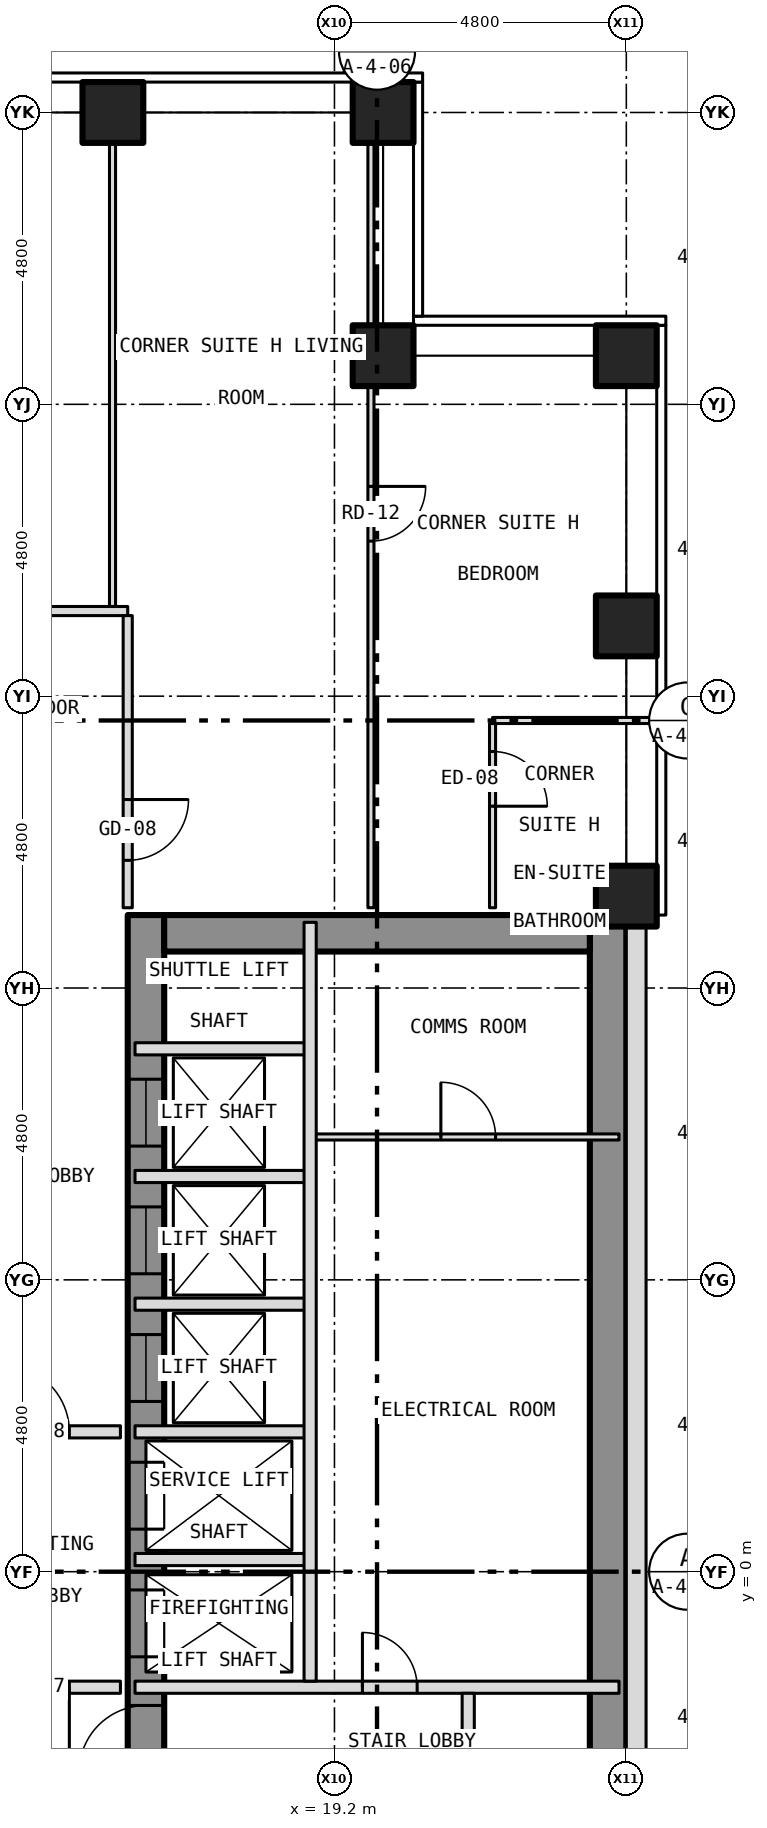
"""IFC4 building model, lengths in metres.
Left out: names, types, materials, properties, quantities, classifications, styles, units other than length and angle.
Written with IfcOpenShell. Run it as: python <this file> out.ifc"""

import sys

from ifc_helpers import new_model, si_unit, direction, frame, frame_2d, origin, origin_2d, place, context, subcontext, project, spatial, rectangle, hollow_rectangle, extrude, element, fill, save


model = new_model("IFC4")
c1 = context("Model", 3, precision=1e-05, world=origin(), true_north=direction((0.0, 1.0)))
c2 = subcontext(c1, "Body", "Model", "MODEL_VIEW")
j1 = project(units=[si_unit("LENGTHUNIT", "METRE"), si_unit("PLANEANGLEUNIT", "RADIAN")], contexts=[c1])
p1 = place(None, origin())
s1 = spatial("IfcSite", under=j1, at=p1, CompositionType="ELEMENT")
p2 = place(p1, origin())
s2 = spatial("IfcBuilding", under=s1, at=p2, CompositionType="ELEMENT")
p3 = place(p2, frame((0.0, 0.0, 74.0)))
s3 = spatial("IfcBuildingStorey", under=s2, at=p3, CompositionType="ELEMENT", Elevation=74.0)
for number, where, z_axis, x_axis in (
    (1, (15.556, 24.0, -0.15), (0.0, 0.0, 1.0), (1.0, 0.0, 0.0)),
    (2, (20.0, 24.0, -0.15), (0.0, 0.0, 1.0), (1.0, 0.0, 0.0)),
    (3, (24.0, 11.111, -0.15), (0.0, 0.0, 1.0), (1.0, 0.0, 0.0)),
    (4, (24.0, 15.556, -0.15), (0.0, 0.0, 1.0), (1.0, 0.0, 0.0)),
    (5, (24.0, 20.0, -0.15), (0.0, 0.0, 1.0), (1.0, 0.0, 0.0)),
    (6, (20.0, 20.0, -0.15), (0.0, 0.0, 1.0), (1.0, 0.0, 0.0)),
):
    element("IfcColumn", number, at=place(p3, frame(where, z_axis=z_axis, x_axis=x_axis)), inside=s3, PredefinedType="COLUMN", context=c2, shape_type="SweptSolid", body=[
        extrude(hollow_rectangle(XDim=1.0, YDim=1.0, WallThickness=0.06, at=origin_2d()), origin(), (0.0, 0.0, 1.0), 3.5),
    ])
p4 = place(p3, frame((16.1, -10.8, 0.0), z_axis=(0.0, 0.0, 1.0), x_axis=(0.0, 1.0, 0.0)))
e7 = element("IfcWall", 7, at=p4, inside=s3, PredefinedType="SHEAR", context=c2, shape_type="SweptSolid", body=[
    extrude(rectangle(XDim=21.6, YDim=0.6, at=frame_2d((10.8, 0.0))), origin(), (0.0, 0.0, 1.0), 3.25),
])
p5 = place(p4, frame((9.4, 0.0, 0.0)))
e8 = element("IfcOpeningElement", 8, at=p5, cuts=e7, PredefinedType="OPENING", context=c2, shape_type="SweptSolid", body=[
    extrude(rectangle(XDim=1.1, YDim=2.1, at=frame_2d((0.55, 1.05))), frame((0.0, 0.312, 0.0), z_axis=(0.0, -1.0, 0.0), x_axis=(1.0, 0.0, 0.0)), (0.0, 0.0, 1.0), 0.624),
])
p6 = place(p4, frame((11.5, 0.0, 0.0)))
e9 = element("IfcOpeningElement", 9, at=p6, cuts=e7, PredefinedType="OPENING", context=c2, shape_type="SweptSolid", body=[
    extrude(rectangle(XDim=1.1, YDim=2.1, at=frame_2d((0.55, 1.05))), frame((0.0, 0.312, 0.0), z_axis=(0.0, -1.0, 0.0), x_axis=(1.0, 0.0, 0.0)), (0.0, 0.0, 1.0), 0.624),
])
p7 = place(p4, frame((13.6, 0.0, 0.0)))
e10 = element("IfcOpeningElement", 10, at=p7, cuts=e7, PredefinedType="OPENING", context=c2, shape_type="SweptSolid", body=[
    extrude(rectangle(XDim=1.1, YDim=2.1, at=frame_2d((0.55, 1.05))), frame((0.0, 0.312, 0.0), z_axis=(0.0, -1.0, 0.0), x_axis=(1.0, 0.0, 0.0)), (0.0, 0.0, 1.0), 0.624),
])
p8 = place(p4, frame((15.7, 0.0, 0.0)))
e11 = element("IfcOpeningElement", 11, at=p8, cuts=e7, PredefinedType="OPENING", context=c2, shape_type="SweptSolid", body=[
    extrude(rectangle(XDim=1.1, YDim=2.1, at=frame_2d((0.55, 1.05))), frame((0.0, 0.312, 0.0), z_axis=(0.0, -1.0, 0.0), x_axis=(1.0, 0.0, 0.0)), (0.0, 0.0, 1.0), 0.624),
])
p9 = place(p4, frame((17.8, 0.0, 0.0)))
e12 = element("IfcOpeningElement", 12, at=p9, cuts=e7, PredefinedType="OPENING", context=c2, shape_type="SweptSolid", body=[
    extrude(rectangle(XDim=1.1, YDim=2.1, at=frame_2d((0.55, 1.05))), frame((0.0, 0.312, 0.0), z_axis=(0.0, -1.0, 0.0), x_axis=(1.0, 0.0, 0.0)), (0.0, 0.0, 1.0), 0.624),
])
p10 = place(p4, frame((5.642, 0.0, 0.0)))
e13 = element("IfcOpeningElement", 13, at=p10, cuts=e7, PredefinedType="OPENING", context=c2, shape_type="SweptSolid", body=[
    extrude(rectangle(XDim=1.1, YDim=2.1, at=frame_2d((0.55, 1.05))), frame((0.0, 0.312, 0.0), z_axis=(0.0, -1.0, 0.0), x_axis=(1.0, 0.0, 0.0)), (0.0, 0.0, 1.0), 0.624),
])
p11 = place(p4, frame((7.5, 0.0, 0.0)))
e14 = element("IfcOpeningElement", 14, at=p11, cuts=e7, PredefinedType="OPENING", context=c2, shape_type="SweptSolid", body=[
    extrude(rectangle(XDim=1.1, YDim=2.1, at=frame_2d((0.55, 1.05))), frame((0.0, 0.312, 0.0), z_axis=(0.0, -1.0, 0.0), x_axis=(1.0, 0.0, 0.0)), (0.0, 0.0, 1.0), 0.624),
])
p12 = place(p3, frame((23.7, -10.8, 0.0), z_axis=(0.0, 0.0, 1.0), x_axis=(0.0, 1.0, 0.0)))
e15 = element("IfcWall", 15, at=p12, inside=s3, PredefinedType="SHEAR", context=c2, shape_type="SweptSolid", body=[
    extrude(rectangle(XDim=21.6, YDim=0.6, at=frame_2d((10.8, 0.0))), origin(), (0.0, 0.0, 1.0), 3.25),
])
p13 = place(p3, frame((16.4, 10.5, 0.0), z_axis=(0.0, 0.0, 1.0), x_axis=(1.0, 0.0, 0.0)))
e16 = element("IfcWall", 16, at=p13, inside=s3, PredefinedType="SHEAR", context=c2, shape_type="SweptSolid", body=[
    extrude(rectangle(XDim=7.0, YDim=0.6, at=frame_2d((3.5, 0.0))), origin(), (0.0, 0.0, 1.0), 3.25),
])
p14 = place(p3, frame((24.163, -10.8, 0.0), z_axis=(0.0, 0.0, 1.0), x_axis=(0.0, 1.0, 0.0)))
e17 = element("IfcWall", 17, at=p14, inside=s3, PredefinedType="SOLIDWALL", context=c2, shape_type="SweptSolid", body=[
    extrude(rectangle(XDim=21.6, YDim=0.325, at=frame_2d((10.8, 0.0))), origin(), (0.0, 0.0, 1.0), 3.5),
])
p15 = place(p14, frame((2.95, 0.0, 1.0)))
e18 = element("IfcOpeningElement", 18, at=p15, cuts=e17, PredefinedType="OPENING", context=c2, shape_type="SweptSolid", body=[
    extrude(rectangle(XDim=0.6, YDim=1.5, at=frame_2d((0.3, 0.75))), frame((0.0, 0.175, 0.0), z_axis=(0.0, -1.0, 0.0), x_axis=(1.0, 0.0, 0.0)), (0.0, 0.0, 1.0), 0.349),
])
p16 = place(p3, frame((12.4, -1.9, 0.0), z_axis=(0.0, 0.0, 1.0), x_axis=(1.0, 0.0, 0.0)))
e19 = element("IfcWall", 19, at=p16, inside=s3, PredefinedType="PARTITIONING", context=c2, shape_type="SweptSolid", body=[
    extrude(rectangle(XDim=3.28, YDim=0.2, at=frame_2d((1.64, 0.0))), origin(), (0.0, 0.0, 1.0), 3.35),
])
p17 = place(p16, frame((1.34, 0.0, 0.0)))
e20 = element("IfcOpeningElement", 20, at=p17, cuts=e19, PredefinedType="OPENING", context=c2, shape_type="SweptSolid", body=[
    extrude(rectangle(XDim=1.1, YDim=2.1, at=frame_2d((0.55, 1.05))), frame((0.0, 0.112, 0.0), z_axis=(0.0, -1.0, 0.0), x_axis=(1.0, 0.0, 0.0)), (0.0, 0.0, 1.0), 0.224),
])
p18 = place(p3, frame((15.92, -1.9, 0.0), z_axis=(0.0, 0.0, 1.0), x_axis=(1.0, 0.0, 0.0)))
e21 = element("IfcWall", 21, at=p18, inside=s3, PredefinedType="PARTITIONING", context=c2, shape_type="SweptSolid", body=[
    extrude(rectangle(XDim=7.96, YDim=0.2, at=frame_2d((3.98, 0.0))), origin(), (0.0, 0.0, 1.0), 3.25),
])
p19 = place(p18, frame((3.74, 0.0, 0.0)))
e22 = element("IfcOpeningElement", 22, at=p19, cuts=e21, PredefinedType="OPENING", context=c2, shape_type="SweptSolid", body=[
    extrude(rectangle(XDim=0.9, YDim=2.1, at=frame_2d((0.45, 1.05))), frame((0.0, 0.112, 0.0), z_axis=(0.0, -1.0, 0.0), x_axis=(1.0, 0.0, 0.0)), (0.0, 0.0, 1.0), 0.224),
])
p20 = place(p3, frame((15.92, 0.2, 0.0), z_axis=(0.0, 0.0, 1.0), x_axis=(1.0, 0.0, 0.0)))
e23 = element("IfcWall", 23, at=p20, inside=s3, PredefinedType="PARTITIONING", context=c2, shape_type="SweptSolid", body=[
    extrude(rectangle(XDim=2.88, YDim=0.2, at=frame_2d((1.44, 0.0))), origin(), (0.0, 0.0, 1.0), 3.25),
])
p21 = place(p3, frame((12.4, 2.3, 0.0), z_axis=(0.0, 0.0, 1.0), x_axis=(1.0, 0.0, 0.0)))
e24 = element("IfcWall", 24, at=p21, inside=s3, PredefinedType="PARTITIONING", context=c2, shape_type="SweptSolid", body=[
    extrude(rectangle(XDim=3.28, YDim=0.2, at=frame_2d((1.64, 0.0))), origin(), (0.0, 0.0, 1.0), 3.35),
])
p22 = place(p21, frame((1.34, 0.0, 0.0)))
e25 = element("IfcOpeningElement", 25, at=p22, cuts=e24, PredefinedType="OPENING", context=c2, shape_type="SweptSolid", body=[
    extrude(rectangle(XDim=1.1, YDim=2.1, at=frame_2d((0.55, 1.05))), frame((0.0, 0.112, 0.0), z_axis=(0.0, -1.0, 0.0), x_axis=(1.0, 0.0, 0.0)), (0.0, 0.0, 1.0), 0.224),
])
for number, where, z_axis, x_axis in (
    (26, (15.92, 2.3, 0.0), (0.0, 0.0, 1.0), (1.0, 0.0, 0.0)),
    (27, (15.92, 4.4, 0.0), (0.0, 0.0, 1.0), (1.0, 0.0, 0.0)),
    (28, (15.92, 6.5, 0.0), (0.0, 0.0, 1.0), (1.0, 0.0, 0.0)),
):
    element("IfcWall", number, at=place(p3, frame(where, z_axis=z_axis, x_axis=x_axis)), inside=s3, PredefinedType="PARTITIONING", context=c2, shape_type="SweptSolid", body=[
        extrude(rectangle(XDim=2.88, YDim=0.2, at=frame_2d((1.44, 0.0))), origin(), (0.0, 0.0, 1.0), 3.25),
    ])
p23 = place(p3, frame((18.8, 7.15, 0.0), z_axis=(0.0, 0.0, 1.0), x_axis=(1.0, 0.0, 0.0)))
e29 = element("IfcWall", 29, at=p23, inside=s3, PredefinedType="PARTITIONING", context=c2, shape_type="SweptSolid", body=[
    extrude(rectangle(XDim=5.08, YDim=0.1, at=frame_2d((2.54, 0.0))), origin(), (0.0, 0.0, 1.0), 3.25),
])
p24 = place(p23, frame((2.15, 0.0, 0.0)))
e30 = element("IfcOpeningElement", 30, at=p24, cuts=e29, PredefinedType="OPENING", context=c2, shape_type="SweptSolid", body=[
    extrude(rectangle(XDim=0.9, YDim=2.1, at=frame_2d((0.45, 1.05))), frame((0.0, 0.062, 0.0), z_axis=(0.0, -1.0, 0.0), x_axis=(1.0, 0.0, 0.0)), (0.0, 0.0, 1.0), 0.124),
])
p25 = place(p3, frame((15.92, 8.6, 0.0), z_axis=(0.0, 0.0, 1.0), x_axis=(1.0, 0.0, 0.0)))
e31 = element("IfcWall", 31, at=p25, inside=s3, PredefinedType="PARTITIONING", context=c2, shape_type="SweptSolid", body=[
    extrude(rectangle(XDim=2.88, YDim=0.2, at=frame_2d((1.44, 0.0))), origin(), (0.0, 0.0, 1.0), 3.25),
])
p26 = place(p3, frame((21.8, 14.0, 0.0), z_axis=(0.0, 0.0, 1.0), x_axis=(1.0, 0.0, 0.0)))
e32 = element("IfcWall", 32, at=p26, inside=s3, PredefinedType="PARTITIONING", context=c2, shape_type="SweptSolid", body=[
    extrude(rectangle(XDim=2.73, YDim=0.1, at=frame_2d((1.365, 0.0))), origin(), (0.0, 0.0, 1.0), 3.35),
])
p27 = place(p3, frame((9.15, 15.8, 0.0), z_axis=(0.0, 0.0, 1.0), x_axis=(1.0, 0.0, 0.0)))
e33 = element("IfcWall", 33, at=p27, inside=s3, PredefinedType="PARTITIONING", context=c2, shape_type="SweptSolid", body=[
    extrude(rectangle(XDim=6.65, YDim=0.15, at=frame_2d((3.325, 0.0))), origin(), (0.0, 0.0, 1.0), 3.35),
])
p28 = place(p27, frame((3.803, 0.0, 0.0)))
e34 = element("IfcOpeningElement", 34, at=p28, cuts=e33, PredefinedType="OPENING", context=c2, shape_type="SweptSolid", body=[
    extrude(rectangle(XDim=1.0, YDim=2.1, at=frame_2d((0.5, 1.05))), frame((0.0, 0.087, 0.0), z_axis=(0.0, -1.0, 0.0), x_axis=(1.0, 0.0, 0.0)), (0.0, 0.0, 1.0), 0.174),
])
p29 = place(p3, frame((15.55, 15.875, 0.0), z_axis=(0.0, 0.0, 1.0), x_axis=(0.0, 1.0, 0.0)))
e35 = element("IfcWall", 35, at=p29, inside=s3, PredefinedType="PARTITIONING", context=c2, shape_type="SweptSolid", body=[
    extrude(rectangle(XDim=8.005, YDim=0.1, at=frame_2d((4.002, 0.0))), origin(), (0.0, 0.0, 1.0), 3.35),
])
p30 = place(p3, frame((15.8, 10.92, 0.0), z_axis=(0.0, 0.0, 1.0), x_axis=(0.0, 1.0, 0.0)))
e36 = element("IfcWall", 36, at=p30, inside=s3, PredefinedType="PARTITIONING", context=c2, shape_type="SweptSolid", body=[
    extrude(rectangle(XDim=4.805, YDim=0.15, at=frame_2d((2.403, 0.0))), origin(), (0.0, 0.0, 1.0), 3.35),
])
p31 = place(p30, frame((0.78, 0.0, 0.0)))
e37 = element("IfcOpeningElement", 37, at=p31, cuts=e36, PredefinedType="OPENING", context=c2, shape_type="SweptSolid", body=[
    extrude(rectangle(XDim=1.0, YDim=2.1, at=frame_2d((0.5, 1.05))), frame((0.0, 0.087, 0.0), z_axis=(0.0, -1.0, 0.0), x_axis=(1.0, 0.0, 0.0)), (0.0, 0.0, 1.0), 0.174),
])
p32 = place(p3, frame((18.8, -1.8, 0.0), z_axis=(0.0, 0.0, 1.0), x_axis=(0.0, 1.0, 0.0)))
e38 = element("IfcWall", 38, at=p32, inside=s3, PredefinedType="PARTITIONING", context=c2, shape_type="SweptSolid", body=[
    extrude(rectangle(XDim=12.48, YDim=0.2, at=frame_2d((6.24, 0.0))), origin(), (0.0, 0.0, 1.0), 3.25),
])
p33 = place(p3, frame((19.8, 10.92, 0.0), z_axis=(0.0, 0.0, 1.0), x_axis=(0.0, 1.0, 0.0)))
e39 = element("IfcWall", 39, at=p33, inside=s3, PredefinedType="PARTITIONING", context=c2, shape_type="SweptSolid", body=[
    extrude(rectangle(XDim=12.96, YDim=0.1, at=frame_2d((6.48, 0.0))), origin(), (0.0, 0.0, 1.0), 3.35),
])
p34 = place(p33, frame((6.03, 0.0, 0.0)))
e40 = element("IfcOpeningElement", 40, at=p34, cuts=e39, PredefinedType="OPENING", context=c2, shape_type="SweptSolid", body=[
    extrude(rectangle(XDim=0.9, YDim=2.1, at=frame_2d((0.45, 1.05))), frame((0.0, 0.062, 0.0), z_axis=(0.0, -1.0, 0.0), x_axis=(1.0, 0.0, 0.0)), (0.0, 0.0, 1.0), 0.124),
])
p35 = place(p3, frame((21.4, -10.68, 0.0), z_axis=(0.0, 0.0, 1.0), x_axis=(0.0, 1.0, 0.0)))
e41 = element("IfcWall", 41, at=p35, inside=s3, PredefinedType="PARTITIONING", context=c2, shape_type="SweptSolid", body=[
    extrude(rectangle(XDim=8.68, YDim=0.2, at=frame_2d((4.34, 0.0))), origin(), (0.0, 0.0, 1.0), 3.25),
])
p36 = place(p35, frame((1.21, 0.0, 0.0)))
e42 = element("IfcOpeningElement", 42, at=p36, cuts=e41, PredefinedType="OPENING", context=c2, shape_type="SweptSolid", body=[
    extrude(rectangle(XDim=0.9, YDim=2.1, at=frame_2d((0.45, 1.05))), frame((0.0, 0.112, 0.0), z_axis=(0.0, -1.0, 0.0), x_axis=(1.0, 0.0, 0.0)), (0.0, 0.0, 1.0), 0.224),
])
p37 = place(p35, frame((5.66, 0.0, 0.0)))
e43 = element("IfcOpeningElement", 43, at=p37, cuts=e41, PredefinedType="OPENING", context=c2, shape_type="SweptSolid", body=[
    extrude(rectangle(XDim=0.9, YDim=2.1, at=frame_2d((0.45, 1.05))), frame((0.0, 0.112, 0.0), z_axis=(0.0, -1.0, 0.0), x_axis=(1.0, 0.0, 0.0)), (0.0, 0.0, 1.0), 0.224),
])
p38 = place(p3, frame((21.8, 10.92, 0.0), z_axis=(0.0, 0.0, 1.0), x_axis=(0.0, 1.0, 0.0)))
e44 = element("IfcWall", 44, at=p38, inside=s3, PredefinedType="PARTITIONING", context=c2, shape_type="SweptSolid", body=[
    extrude(rectangle(XDim=3.03, YDim=0.1, at=frame_2d((1.515, 0.0))), origin(), (0.0, 0.0, 1.0), 3.35),
])
p39 = place(p38, frame((1.67, 0.0, 0.0)))
e45 = element("IfcOpeningElement", 45, at=p39, cuts=e44, PredefinedType="OPENING", context=c2, shape_type="SweptSolid", body=[
    extrude(rectangle(XDim=0.9, YDim=2.1, at=frame_2d((0.45, 1.05))), frame((0.0, 0.062, 0.0), z_axis=(0.0, -1.0, 0.0), x_axis=(1.0, 0.0, 0.0)), (0.0, 0.0, 1.0), 0.124),
])
p40 = place(p5, origin())
e46 = element("IfcDoor", 46, at=p40, inside=s3, OperationType="SLIDING_TO_LEFT", PredefinedType="DOOR", context=c2, shape_type="SweptSolid", body=[
    extrude(rectangle(XDim=1.1, YDim=2.1, at=frame_2d((0.55, 1.05))), frame((0.0, 0.025, 0.0), z_axis=(0.0, -1.0, 0.0), x_axis=(1.0, 0.0, 0.0)), (0.0, 0.0, 1.0), 0.05),
])
fill(e8, e46)
p41 = place(p6, origin())
e47 = element("IfcDoor", 47, at=p41, inside=s3, OperationType="SLIDING_TO_LEFT", PredefinedType="DOOR", context=c2, shape_type="SweptSolid", body=[
    extrude(rectangle(XDim=1.1, YDim=2.1, at=frame_2d((0.55, 1.05))), frame((0.0, 0.025, 0.0), z_axis=(0.0, -1.0, 0.0), x_axis=(1.0, 0.0, 0.0)), (0.0, 0.0, 1.0), 0.05),
])
fill(e9, e47)
p42 = place(p7, origin())
e48 = element("IfcDoor", 48, at=p42, inside=s3, OperationType="SLIDING_TO_LEFT", PredefinedType="DOOR", context=c2, shape_type="SweptSolid", body=[
    extrude(rectangle(XDim=1.1, YDim=2.1, at=frame_2d((0.55, 1.05))), frame((0.0, 0.025, 0.0), z_axis=(0.0, -1.0, 0.0), x_axis=(1.0, 0.0, 0.0)), (0.0, 0.0, 1.0), 0.05),
])
fill(e10, e48)
p43 = place(p8, origin())
e49 = element("IfcDoor", 49, at=p43, inside=s3, OperationType="SLIDING_TO_LEFT", PredefinedType="DOOR", context=c2, shape_type="SweptSolid", body=[
    extrude(rectangle(XDim=1.1, YDim=2.1, at=frame_2d((0.55, 1.05))), frame((0.0, 0.025, 0.0), z_axis=(0.0, -1.0, 0.0), x_axis=(1.0, 0.0, 0.0)), (0.0, 0.0, 1.0), 0.05),
])
fill(e11, e49)
p44 = place(p9, origin())
e50 = element("IfcDoor", 50, at=p44, inside=s3, OperationType="SLIDING_TO_LEFT", PredefinedType="DOOR", context=c2, shape_type="SweptSolid", body=[
    extrude(rectangle(XDim=1.1, YDim=2.1, at=frame_2d((0.55, 1.05))), frame((0.0, 0.025, 0.0), z_axis=(0.0, -1.0, 0.0), x_axis=(1.0, 0.0, 0.0)), (0.0, 0.0, 1.0), 0.05),
])
fill(e12, e50)
p45 = place(p11, origin())
e51 = element("IfcDoor", 51, at=p45, inside=s3, OperationType="SINGLE_SWING_LEFT", PredefinedType="DOOR", context=c2, shape_type="SweptSolid", body=[
    extrude(rectangle(XDim=1.1, YDim=2.1, at=frame_2d((0.55, 1.05))), frame((0.0, 0.025, 0.0), z_axis=(0.0, -1.0, 0.0), x_axis=(1.0, 0.0, 0.0)), (0.0, 0.0, 1.0), 0.05),
])
fill(e14, e51)
p46 = place(p19, origin())
e52 = element("IfcDoor", 52, at=p46, inside=s3, OperationType="SINGLE_SWING_LEFT", PredefinedType="DOOR", context=c2, shape_type="SweptSolid", body=[
    extrude(rectangle(XDim=0.9, YDim=2.1, at=frame_2d((0.45, 1.05))), frame((0.0, 0.025, 0.0), z_axis=(0.0, -1.0, 0.0), x_axis=(1.0, 0.0, 0.0)), (0.0, 0.0, 1.0), 0.05),
])
fill(e22, e52)
p47 = place(p24, origin())
e53 = element("IfcDoor", 53, at=p47, inside=s3, OperationType="SINGLE_SWING_LEFT", PredefinedType="DOOR", context=c2, shape_type="SweptSolid", body=[
    extrude(rectangle(XDim=0.9, YDim=2.1, at=frame_2d((0.45, 1.05))), frame((0.0, 0.025, 0.0), z_axis=(0.0, -1.0, 0.0), x_axis=(1.0, 0.0, 0.0)), (0.0, 0.0, 1.0), 0.05),
])
fill(e30, e53)
p48 = place(p17, origin())
e54 = element("IfcDoor", 54, at=p48, inside=s3, OperationType="SINGLE_SWING_RIGHT", PredefinedType="DOOR", context=c2, shape_type="SweptSolid", body=[
    extrude(rectangle(XDim=1.1, YDim=2.1, at=frame_2d((0.55, 1.05))), frame((0.0, 0.025, 0.0), z_axis=(0.0, -1.0, 0.0), x_axis=(1.0, 0.0, 0.0)), (0.0, 0.0, 1.0), 0.05),
])
fill(e20, e54)
p49 = place(p22, origin())
e55 = element("IfcDoor", 55, at=p49, inside=s3, OperationType="SINGLE_SWING_LEFT", PredefinedType="DOOR", context=c2, shape_type="SweptSolid", body=[
    extrude(rectangle(XDim=1.1, YDim=2.1, at=frame_2d((0.55, 1.05))), frame((0.0, 0.025, 0.0), z_axis=(0.0, -1.0, 0.0), x_axis=(1.0, 0.0, 0.0)), (0.0, 0.0, 1.0), 0.05),
])
fill(e25, e55)
p50 = place(p31, origin())
e56 = element("IfcDoor", 56, at=p50, inside=s3, OperationType="SINGLE_SWING_RIGHT", PredefinedType="DOOR", context=c2, shape_type="SweptSolid", body=[
    extrude(rectangle(XDim=1.0, YDim=2.1, at=frame_2d((0.5, 1.05))), frame((0.0, 0.025, 0.0), z_axis=(0.0, -1.0, 0.0), x_axis=(1.0, 0.0, 0.0)), (0.0, 0.0, 1.0), 0.05),
])
fill(e37, e56)
p51 = place(p34, origin())
e57 = element("IfcDoor", 57, at=p51, inside=s3, OperationType="SINGLE_SWING_RIGHT", PredefinedType="DOOR", context=c2, shape_type="SweptSolid", body=[
    extrude(rectangle(XDim=0.9, YDim=2.1, at=frame_2d((0.45, 1.05))), frame((0.0, 0.025, 0.0), z_axis=(0.0, -1.0, 0.0), x_axis=(1.0, 0.0, 0.0)), (0.0, 0.0, 1.0), 0.05),
])
fill(e40, e57)
p52 = place(p39, origin())
e58 = element("IfcDoor", 58, at=p52, inside=s3, OperationType="SINGLE_SWING_LEFT", PredefinedType="DOOR", context=c2, shape_type="SweptSolid", body=[
    extrude(rectangle(XDim=0.9, YDim=2.1, at=frame_2d((0.45, 1.05))), frame((0.0, 0.025, 0.0), z_axis=(0.0, -1.0, 0.0), x_axis=(1.0, 0.0, 0.0)), (0.0, 0.0, 1.0), 0.05),
])
fill(e45, e58)
save(model, sys.argv[1])
